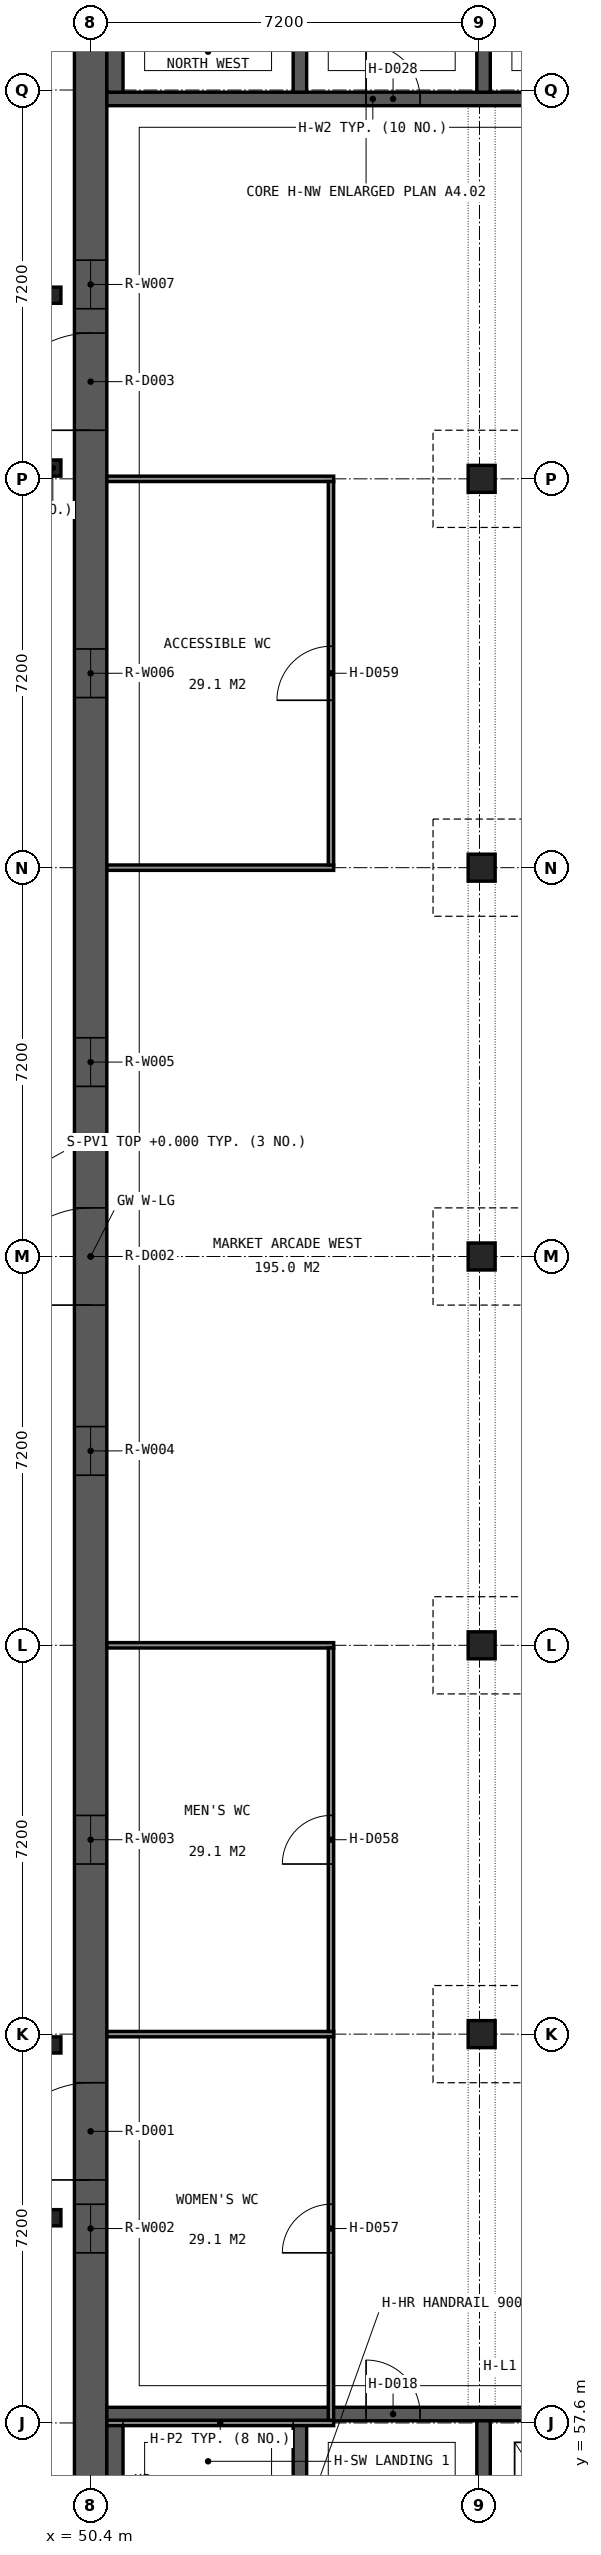
"""IFC4 building model, lengths in metres.
Left out: names, types, materials, properties, quantities, classifications, styles, units other than length and angle.
Written with IfcOpenShell. Run it as: python <this file> out.ifc"""

import sys

from ifc_helpers import new_model, si_unit, direction, frame, frame_2d, origin, origin_2d, place, context, subcontext, project, spatial, rectangle, extrude, element, fill, save


model = new_model("IFC4")
c1 = context("Model", 3, precision=1e-05, world=origin(), true_north=direction((0.0, 1.0)))
c2 = subcontext(c1, "Body", "Model", "MODEL_VIEW")
j1 = project(units=[si_unit("LENGTHUNIT", "METRE"), si_unit("PLANEANGLEUNIT", "RADIAN")], contexts=[c1])
p1 = place(None, origin())
s1 = spatial("IfcSite", under=j1, at=p1, CompositionType="ELEMENT")
p2 = place(p1, origin())
s2 = spatial("IfcBuilding", under=s1, at=p2, CompositionType="ELEMENT")
p3 = place(p2, origin())
s3 = spatial("IfcBuildingStorey", under=s2, at=p3, CompositionType="ELEMENT", Elevation=0.0)
p4 = place(p3, frame((50.4, 52.2, 0.0), z_axis=(0.0, 0.0, 1.0), x_axis=(0.0, 1.0, 0.0)))
e1 = element("IfcWall", 1, at=p4, inside=s3, PredefinedType="SOLIDWALL", context=c2, shape_type="SweptSolid", body=[
    extrude(rectangle(XDim=54.0, YDim=0.6, at=frame_2d((27.0, 0.0))), origin(), (0.0, 0.0, 1.0), 4.8),
])
p5 = place(p4, frame((1.35, 0.0, 0.9)))
e2 = element("IfcOpeningElement", 2, at=p5, cuts=e1, PredefinedType="OPENING", context=c2, shape_type="SweptSolid", body=[
    extrude(rectangle(XDim=0.9, YDim=3.3, at=frame_2d((0.45, 1.65))), frame((0.0, 0.31, 0.0), z_axis=(0.0, -1.0, 0.0), x_axis=(1.0, 0.0, 0.0)), (0.0, 0.0, 1.0), 0.62),
])
p6 = place(p4, frame((8.55, 0.0, 0.9)))
e3 = element("IfcOpeningElement", 3, at=p6, cuts=e1, PredefinedType="OPENING", context=c2, shape_type="SweptSolid", body=[
    extrude(rectangle(XDim=0.9, YDim=3.3, at=frame_2d((0.45, 1.65))), frame((0.0, 0.31, 0.0), z_axis=(0.0, -1.0, 0.0), x_axis=(1.0, 0.0, 0.0)), (0.0, 0.0, 1.0), 0.62),
])
p7 = place(p4, frame((15.75, 0.0, 0.9)))
e4 = element("IfcOpeningElement", 4, at=p7, cuts=e1, PredefinedType="OPENING", context=c2, shape_type="SweptSolid", body=[
    extrude(rectangle(XDim=0.9, YDim=3.3, at=frame_2d((0.45, 1.65))), frame((0.0, 0.31, 0.0), z_axis=(0.0, -1.0, 0.0), x_axis=(1.0, 0.0, 0.0)), (0.0, 0.0, 1.0), 0.62),
])
p8 = place(p4, frame((22.95, 0.0, 0.9)))
e5 = element("IfcOpeningElement", 5, at=p8, cuts=e1, PredefinedType="OPENING", context=c2, shape_type="SweptSolid", body=[
    extrude(rectangle(XDim=0.9, YDim=3.3, at=frame_2d((0.45, 1.65))), frame((0.0, 0.31, 0.0), z_axis=(0.0, -1.0, 0.0), x_axis=(1.0, 0.0, 0.0)), (0.0, 0.0, 1.0), 0.62),
])
p9 = place(p4, frame((30.15, 0.0, 0.9)))
e6 = element("IfcOpeningElement", 6, at=p9, cuts=e1, PredefinedType="OPENING", context=c2, shape_type="SweptSolid", body=[
    extrude(rectangle(XDim=0.9, YDim=3.3, at=frame_2d((0.45, 1.65))), frame((0.0, 0.31, 0.0), z_axis=(0.0, -1.0, 0.0), x_axis=(1.0, 0.0, 0.0)), (0.0, 0.0, 1.0), 0.62),
])
p10 = place(p4, frame((37.35, 0.0, 0.9)))
e7 = element("IfcOpeningElement", 7, at=p10, cuts=e1, PredefinedType="OPENING", context=c2, shape_type="SweptSolid", body=[
    extrude(rectangle(XDim=0.9, YDim=3.3, at=frame_2d((0.45, 1.65))), frame((0.0, 0.31, 0.0), z_axis=(0.0, -1.0, 0.0), x_axis=(1.0, 0.0, 0.0)), (0.0, 0.0, 1.0), 0.62),
])
p11 = place(p4, frame((44.55, 0.0, 0.9)))
e8 = element("IfcOpeningElement", 8, at=p11, cuts=e1, PredefinedType="OPENING", context=c2, shape_type="SweptSolid", body=[
    extrude(rectangle(XDim=0.9, YDim=3.3, at=frame_2d((0.45, 1.65))), frame((0.0, 0.31, 0.0), z_axis=(0.0, -1.0, 0.0), x_axis=(1.0, 0.0, 0.0)), (0.0, 0.0, 1.0), 0.62),
])
p12 = place(p4, frame((51.75, 0.0, 0.9)))
e9 = element("IfcOpeningElement", 9, at=p12, cuts=e1, PredefinedType="OPENING", context=c2, shape_type="SweptSolid", body=[
    extrude(rectangle(XDim=0.9, YDim=3.3, at=frame_2d((0.45, 1.65))), frame((0.0, 0.31, 0.0), z_axis=(0.0, -1.0, 0.0), x_axis=(1.0, 0.0, 0.0)), (0.0, 0.0, 1.0), 0.62),
])
p13 = place(p4, frame((9.9, 0.0, 0.0)))
e10 = element("IfcOpeningElement", 10, at=p13, cuts=e1, PredefinedType="OPENING", context=c2, shape_type="SweptSolid", body=[
    extrude(rectangle(XDim=1.8, YDim=2.4, at=frame_2d((0.9, 1.2))), frame((0.0, 0.31, 0.0), z_axis=(0.0, -1.0, 0.0), x_axis=(1.0, 0.0, 0.0)), (0.0, 0.0, 1.0), 0.62),
])
p14 = place(p4, frame((26.1, 0.0, 0.0)))
e11 = element("IfcOpeningElement", 11, at=p14, cuts=e1, PredefinedType="OPENING", context=c2, shape_type="SweptSolid", body=[
    extrude(rectangle(XDim=1.8, YDim=2.4, at=frame_2d((0.9, 1.2))), frame((0.0, 0.31, 0.0), z_axis=(0.0, -1.0, 0.0), x_axis=(1.0, 0.0, 0.0)), (0.0, 0.0, 1.0), 0.62),
])
p15 = place(p4, frame((42.3, 0.0, 0.0)))
e12 = element("IfcOpeningElement", 12, at=p15, cuts=e1, PredefinedType="OPENING", context=c2, shape_type="SweptSolid", body=[
    extrude(rectangle(XDim=1.8, YDim=2.4, at=frame_2d((0.9, 1.2))), frame((0.0, 0.31, 0.0), z_axis=(0.0, -1.0, 0.0), x_axis=(1.0, 0.0, 0.0)), (0.0, 0.0, 1.0), 0.62),
])
for number, where, z_axis, x_axis in (
    (13, (49.7, 93.8, 0.0), (0.0, 0.0, 1.0), (1.0, 0.0, 0.0)),
    (14, (49.7, 97.0, 0.0), (0.0, 0.0, 1.0), (1.0, 0.0, 0.0)),
    (15, (49.7, 61.4, 0.0), (0.0, 0.0, 1.0), (1.0, 0.0, 0.0)),
    (16, (49.7, 64.6, 0.0), (0.0, 0.0, 1.0), (1.0, 0.0, 0.0)),
):
    element("IfcColumn", number, at=place(p3, frame(where, z_axis=z_axis, x_axis=x_axis)), inside=s3, PredefinedType="COLUMN", context=c2, shape_type="SweptSolid", body=[
        extrude(rectangle(XDim=0.3, YDim=0.3, at=origin_2d()), origin(), (0.0, 0.0, 1.0), 4.6),
    ])
for number, where, z_axis, x_axis in (
    (17, (57.64, 64.8, 0.0), (0.0, 0.0, 1.0), (1.0, 0.0, 0.0)),
    (18, (57.64, 72.0, 0.0), (0.0, 0.0, 1.0), (1.0, 0.0, 0.0)),
    (19, (57.64, 79.2, 0.0), (0.0, 0.0, 1.0), (1.0, 0.0, 0.0)),
    (20, (57.64, 86.4, 0.0), (0.0, 0.0, 1.0), (1.0, 0.0, 0.0)),
    (21, (57.64, 93.6, 0.0), (0.0, 0.0, 1.0), (1.0, 0.0, 0.0)),
):
    element("IfcColumn", number, at=place(p3, frame(where, z_axis=z_axis, x_axis=x_axis)), inside=s3, PredefinedType="COLUMN", context=c2, shape_type="SweptSolid", body=[
        extrude(rectangle(XDim=0.5, YDim=0.5, at=origin_2d()), origin(), (0.0, 0.0, 1.0), 4.8),
    ])
p16 = place(p3, frame((50.7, 57.765, 0.0), z_axis=(0.0, 0.0, 1.0), x_axis=(1.0, 0.0, 0.0)))
e22 = element("IfcWall", 22, at=p16, inside=s3, PredefinedType="SOLIDWALL", context=c2, shape_type="SweptSolid", body=[
    extrude(rectangle(XDim=9.85, YDim=0.25, at=frame_2d((4.925, 0.0))), origin(), (0.0, 0.0, 1.0), 4.8),
])
p17 = place(p16, frame((4.8, 0.0, 0.0)))
e23 = element("IfcOpeningElement", 23, at=p17, cuts=e22, PredefinedType="OPENING", context=c2, shape_type="SweptSolid", body=[
    extrude(rectangle(XDim=1.0, YDim=2.1, at=frame_2d((0.5, 1.05))), frame((0.0, 0.135, 0.0), z_axis=(0.0, -1.0, 0.0), x_axis=(1.0, 0.0, 0.0)), (0.0, 0.0, 1.0), 0.27),
])
p18 = place(p3, frame((54.275, 51.0, 0.0), z_axis=(0.0, 0.0, 1.0), x_axis=(0.0, 1.0, 0.0)))
e24 = element("IfcWall", 24, at=p18, inside=s3, PredefinedType="SOLIDWALL", context=c2, shape_type="SweptSolid", body=[
    extrude(rectangle(XDim=6.64, YDim=0.25, at=frame_2d((3.32, 0.0))), origin(), (0.0, 0.0, 1.0), 4.8),
])
p19 = place(p18, frame((0.35, 0.0, 0.0)))
e25 = element("IfcOpeningElement", 25, at=p19, cuts=e24, PredefinedType="OPENING", context=c2, shape_type="SweptSolid", body=[
    extrude(rectangle(XDim=1.0, YDim=2.1, at=frame_2d((0.5, 1.05))), frame((0.0, 0.135, 0.0), z_axis=(0.0, -1.0, 0.0), x_axis=(1.0, 0.0, 0.0)), (0.0, 0.0, 1.0), 0.27),
])
p20 = place(p3, frame((57.675, 54.39, 0.0), z_axis=(0.0, 0.0, 1.0), x_axis=(0.0, 1.0, 0.0)))
e26 = element("IfcWall", 26, at=p20, inside=s3, PredefinedType="SOLIDWALL", context=c2, shape_type="SweptSolid", body=[
    extrude(rectangle(XDim=3.25, YDim=0.25, at=frame_2d((1.625, 0.0))), origin(), (0.0, 0.0, 1.0), 4.8),
])
p21 = place(p3, frame((50.85, 52.2, 0.0), z_axis=(0.0, 0.0, 1.0), x_axis=(0.0, 1.0, 0.0)))
e27 = element("IfcWall", 27, at=p21, inside=s3, PredefinedType="SOLIDWALL", context=c2, shape_type="SweptSolid", body=[
    extrude(rectangle(XDim=5.44, YDim=0.3, at=frame_2d((2.72, 0.0))), origin(), (0.0, 0.0, 1.0), 4.8),
])
p22 = place(p3, frame((50.7, 100.635, 0.0), z_axis=(0.0, 0.0, 1.0), x_axis=(1.0, 0.0, 0.0)))
e28 = element("IfcWall", 28, at=p22, inside=s3, PredefinedType="SOLIDWALL", context=c2, shape_type="SweptSolid", body=[
    extrude(rectangle(XDim=9.85, YDim=0.25, at=frame_2d((4.925, 0.0))), origin(), (0.0, 0.0, 1.0), 4.8),
])
p23 = place(p22, frame((4.8, 0.0, 0.0)))
e29 = element("IfcOpeningElement", 29, at=p23, cuts=e28, PredefinedType="OPENING", context=c2, shape_type="SweptSolid", body=[
    extrude(rectangle(XDim=1.0, YDim=2.1, at=frame_2d((0.5, 1.05))), frame((0.0, 0.135, 0.0), z_axis=(0.0, -1.0, 0.0), x_axis=(1.0, 0.0, 0.0)), (0.0, 0.0, 1.0), 0.27),
])
p24 = place(p3, frame((54.275, 100.76, 0.0), z_axis=(0.0, 0.0, 1.0), x_axis=(0.0, 1.0, 0.0)))
e30 = element("IfcWall", 30, at=p24, inside=s3, PredefinedType="SOLIDWALL", context=c2, shape_type="SweptSolid", body=[
    extrude(rectangle(XDim=6.64, YDim=0.25, at=frame_2d((3.32, 0.0))), origin(), (0.0, 0.0, 1.0), 4.8),
])
p25 = place(p24, frame((5.29, 0.0, 0.0)))
e31 = element("IfcOpeningElement", 31, at=p25, cuts=e30, PredefinedType="OPENING", context=c2, shape_type="SweptSolid", body=[
    extrude(rectangle(XDim=1.0, YDim=2.1, at=frame_2d((0.5, 1.05))), frame((0.0, 0.135, 0.0), z_axis=(0.0, -1.0, 0.0), x_axis=(1.0, 0.0, 0.0)), (0.0, 0.0, 1.0), 0.27),
])
p26 = place(p3, frame((57.675, 100.76, 0.0), z_axis=(0.0, 0.0, 1.0), x_axis=(0.0, 1.0, 0.0)))
e32 = element("IfcWall", 32, at=p26, inside=s3, PredefinedType="SOLIDWALL", context=c2, shape_type="SweptSolid", body=[
    extrude(rectangle(XDim=3.25, YDim=0.25, at=frame_2d((1.625, 0.0))), origin(), (0.0, 0.0, 1.0), 4.8),
])
p27 = place(p3, frame((50.85, 100.76, 0.0), z_axis=(0.0, 0.0, 1.0), x_axis=(0.0, 1.0, 0.0)))
e33 = element("IfcWall", 33, at=p27, inside=s3, PredefinedType="SOLIDWALL", context=c2, shape_type="SweptSolid", body=[
    extrude(rectangle(XDim=5.44, YDim=0.3, at=frame_2d((2.72, 0.0))), origin(), (0.0, 0.0, 1.0), 4.8),
])
for number, where, z_axis, x_axis in (
    (34, (50.7, 57.6, 0.0), (0.0, 0.0, 1.0), (1.0, 0.0, 0.0)),
    (35, (50.7, 64.8, 0.0), (0.0, 0.0, 1.0), (1.0, 0.0, 0.0)),
    (36, (50.7, 72.0, 0.0), (0.0, 0.0, 1.0), (1.0, 0.0, 0.0)),
    (37, (50.7, 86.4, 0.0), (0.0, 0.0, 1.0), (1.0, 0.0, 0.0)),
    (38, (50.7, 93.6, 0.0), (0.0, 0.0, 1.0), (1.0, 0.0, 0.0)),
):
    element("IfcWall", number, at=place(p3, frame(where, z_axis=z_axis, x_axis=x_axis)), inside=s3, PredefinedType="PARTITIONING", context=c2, shape_type="SweptSolid", body=[
        extrude(rectangle(XDim=4.2, YDim=0.1, at=frame_2d((2.1, 0.0))), origin(), (0.0, 0.0, 1.0), 3.95),
    ])
p28 = place(p3, frame((54.85, 57.65, 0.0), z_axis=(0.0, 0.0, 1.0), x_axis=(0.0, 1.0, 0.0)))
e39 = element("IfcWall", 39, at=p28, inside=s3, PredefinedType="PARTITIONING", context=c2, shape_type="SweptSolid", body=[
    extrude(rectangle(XDim=7.1, YDim=0.1, at=frame_2d((3.55, 0.0))), origin(), (0.0, 0.0, 1.0), 3.95),
])
p29 = place(p28, frame((3.1, 0.0, 0.0)))
e40 = element("IfcOpeningElement", 40, at=p29, cuts=e39, PredefinedType="OPENING", context=c2, shape_type="SweptSolid", body=[
    extrude(rectangle(XDim=0.9, YDim=2.1, at=frame_2d((0.45, 1.05))), frame((0.0, 0.06, 0.0), z_axis=(0.0, -1.0, 0.0), x_axis=(1.0, 0.0, 0.0)), (0.0, 0.0, 1.0), 0.12),
])
p30 = place(p3, frame((54.85, 64.85, 0.0), z_axis=(0.0, 0.0, 1.0), x_axis=(0.0, 1.0, 0.0)))
e41 = element("IfcWall", 41, at=p30, inside=s3, PredefinedType="PARTITIONING", context=c2, shape_type="SweptSolid", body=[
    extrude(rectangle(XDim=7.1, YDim=0.1, at=frame_2d((3.55, 0.0))), origin(), (0.0, 0.0, 1.0), 3.95),
])
p31 = place(p30, frame((3.1, 0.0, 0.0)))
e42 = element("IfcOpeningElement", 42, at=p31, cuts=e41, PredefinedType="OPENING", context=c2, shape_type="SweptSolid", body=[
    extrude(rectangle(XDim=0.9, YDim=2.1, at=frame_2d((0.45, 1.05))), frame((0.0, 0.06, 0.0), z_axis=(0.0, -1.0, 0.0), x_axis=(1.0, 0.0, 0.0)), (0.0, 0.0, 1.0), 0.12),
])
p32 = place(p3, frame((54.85, 86.45, 0.0), z_axis=(0.0, 0.0, 1.0), x_axis=(0.0, 1.0, 0.0)))
e43 = element("IfcWall", 43, at=p32, inside=s3, PredefinedType="PARTITIONING", context=c2, shape_type="SweptSolid", body=[
    extrude(rectangle(XDim=7.1, YDim=0.1, at=frame_2d((3.55, 0.0))), origin(), (0.0, 0.0, 1.0), 3.95),
])
p33 = place(p32, frame((3.05, 0.0, 0.0)))
e44 = element("IfcOpeningElement", 44, at=p33, cuts=e43, PredefinedType="OPENING", context=c2, shape_type="SweptSolid", body=[
    extrude(rectangle(XDim=1.0, YDim=2.1, at=frame_2d((0.5, 1.05))), frame((0.0, 0.06, 0.0), z_axis=(0.0, -1.0, 0.0), x_axis=(1.0, 0.0, 0.0)), (0.0, 0.0, 1.0), 0.12),
])
p34 = place(p6, origin())
e45 = element("IfcWindow", 45, at=p34, inside=s3, PartitioningType="SINGLE_PANEL", PredefinedType="WINDOW", context=c2, shape_type="SweptSolid", body=[
    extrude(rectangle(XDim=0.9, YDim=3.3, at=frame_2d((0.45, 1.65))), frame((0.0, 0.03, 0.0), z_axis=(0.0, -1.0, 0.0), x_axis=(1.0, 0.0, 0.0)), (0.0, 0.0, 1.0), 0.06),
])
fill(e3, e45)
p35 = place(p7, origin())
e46 = element("IfcWindow", 46, at=p35, inside=s3, PartitioningType="SINGLE_PANEL", PredefinedType="WINDOW", context=c2, shape_type="SweptSolid", body=[
    extrude(rectangle(XDim=0.9, YDim=3.3, at=frame_2d((0.45, 1.65))), frame((0.0, 0.03, 0.0), z_axis=(0.0, -1.0, 0.0), x_axis=(1.0, 0.0, 0.0)), (0.0, 0.0, 1.0), 0.06),
])
fill(e4, e46)
p36 = place(p8, origin())
e47 = element("IfcWindow", 47, at=p36, inside=s3, PartitioningType="SINGLE_PANEL", PredefinedType="WINDOW", context=c2, shape_type="SweptSolid", body=[
    extrude(rectangle(XDim=0.9, YDim=3.3, at=frame_2d((0.45, 1.65))), frame((0.0, 0.03, 0.0), z_axis=(0.0, -1.0, 0.0), x_axis=(1.0, 0.0, 0.0)), (0.0, 0.0, 1.0), 0.06),
])
fill(e5, e47)
p37 = place(p9, origin())
e48 = element("IfcWindow", 48, at=p37, inside=s3, PartitioningType="SINGLE_PANEL", PredefinedType="WINDOW", context=c2, shape_type="SweptSolid", body=[
    extrude(rectangle(XDim=0.9, YDim=3.3, at=frame_2d((0.45, 1.65))), frame((0.0, 0.03, 0.0), z_axis=(0.0, -1.0, 0.0), x_axis=(1.0, 0.0, 0.0)), (0.0, 0.0, 1.0), 0.06),
])
fill(e6, e48)
p38 = place(p10, origin())
e49 = element("IfcWindow", 49, at=p38, inside=s3, PartitioningType="SINGLE_PANEL", PredefinedType="WINDOW", context=c2, shape_type="SweptSolid", body=[
    extrude(rectangle(XDim=0.9, YDim=3.3, at=frame_2d((0.45, 1.65))), frame((0.0, 0.03, 0.0), z_axis=(0.0, -1.0, 0.0), x_axis=(1.0, 0.0, 0.0)), (0.0, 0.0, 1.0), 0.06),
])
fill(e7, e49)
p39 = place(p11, origin())
e50 = element("IfcWindow", 50, at=p39, inside=s3, PartitioningType="SINGLE_PANEL", PredefinedType="WINDOW", context=c2, shape_type="SweptSolid", body=[
    extrude(rectangle(XDim=0.9, YDim=3.3, at=frame_2d((0.45, 1.65))), frame((0.0, 0.03, 0.0), z_axis=(0.0, -1.0, 0.0), x_axis=(1.0, 0.0, 0.0)), (0.0, 0.0, 1.0), 0.06),
])
fill(e8, e50)
p40 = place(p13, origin())
e51 = element("IfcDoor", 51, at=p40, inside=s3, OperationType="DOUBLE_DOOR_SINGLE_SWING", PredefinedType="DOOR", context=c2, shape_type="SweptSolid", body=[
    extrude(rectangle(XDim=1.8, YDim=2.4, at=frame_2d((0.9, 1.2))), frame((0.0, 0.025, 0.0), z_axis=(0.0, -1.0, 0.0), x_axis=(1.0, 0.0, 0.0)), (0.0, 0.0, 1.0), 0.05),
])
fill(e10, e51)
p41 = place(p14, origin())
e52 = element("IfcDoor", 52, at=p41, inside=s3, OperationType="DOUBLE_DOOR_SINGLE_SWING", PredefinedType="DOOR", context=c2, shape_type="SweptSolid", body=[
    extrude(rectangle(XDim=1.8, YDim=2.4, at=frame_2d((0.9, 1.2))), frame((0.0, 0.025, 0.0), z_axis=(0.0, -1.0, 0.0), x_axis=(1.0, 0.0, 0.0)), (0.0, 0.0, 1.0), 0.05),
])
fill(e11, e52)
p42 = place(p15, origin())
e53 = element("IfcDoor", 53, at=p42, inside=s3, OperationType="DOUBLE_DOOR_SINGLE_SWING", PredefinedType="DOOR", context=c2, shape_type="SweptSolid", body=[
    extrude(rectangle(XDim=1.8, YDim=2.4, at=frame_2d((0.9, 1.2))), frame((0.0, 0.025, 0.0), z_axis=(0.0, -1.0, 0.0), x_axis=(1.0, 0.0, 0.0)), (0.0, 0.0, 1.0), 0.05),
])
fill(e12, e53)
p43 = place(p17, origin())
e54 = element("IfcDoor", 54, at=p43, inside=s3, OperationType="SINGLE_SWING_LEFT", PredefinedType="DOOR", context=c2, shape_type="SweptSolid", body=[
    extrude(rectangle(XDim=1.0, YDim=2.1, at=frame_2d((0.5, 1.05))), frame((0.0, 0.025, 0.0), z_axis=(0.0, -1.0, 0.0), x_axis=(1.0, 0.0, 0.0)), (0.0, 0.0, 1.0), 0.05),
])
fill(e23, e54)
p44 = place(p23, origin())
e55 = element("IfcDoor", 55, at=p44, inside=s3, OperationType="SINGLE_SWING_LEFT", PredefinedType="DOOR", context=c2, shape_type="SweptSolid", body=[
    extrude(rectangle(XDim=1.0, YDim=2.1, at=frame_2d((0.5, 1.05))), frame((0.0, 0.025, 0.0), z_axis=(0.0, -1.0, 0.0), x_axis=(1.0, 0.0, 0.0)), (0.0, 0.0, 1.0), 0.05),
])
fill(e29, e55)
p45 = place(p29, origin())
e56 = element("IfcDoor", 56, at=p45, inside=s3, OperationType="SINGLE_SWING_LEFT", PredefinedType="DOOR", context=c2, shape_type="SweptSolid", body=[
    extrude(rectangle(XDim=0.9, YDim=2.1, at=frame_2d((0.45, 1.05))), frame((0.0, 0.025, 0.0), z_axis=(0.0, -1.0, 0.0), x_axis=(1.0, 0.0, 0.0)), (0.0, 0.0, 1.0), 0.05),
])
fill(e40, e56)
p46 = place(p31, origin())
e57 = element("IfcDoor", 57, at=p46, inside=s3, OperationType="SINGLE_SWING_LEFT", PredefinedType="DOOR", context=c2, shape_type="SweptSolid", body=[
    extrude(rectangle(XDim=0.9, YDim=2.1, at=frame_2d((0.45, 1.05))), frame((0.0, 0.025, 0.0), z_axis=(0.0, -1.0, 0.0), x_axis=(1.0, 0.0, 0.0)), (0.0, 0.0, 1.0), 0.05),
])
fill(e42, e57)
p47 = place(p33, origin())
e58 = element("IfcDoor", 58, at=p47, inside=s3, OperationType="SINGLE_SWING_LEFT", PredefinedType="DOOR", context=c2, shape_type="SweptSolid", body=[
    extrude(rectangle(XDim=1.0, YDim=2.1, at=frame_2d((0.5, 1.05))), frame((0.0, 0.025, 0.0), z_axis=(0.0, -1.0, 0.0), x_axis=(1.0, 0.0, 0.0)), (0.0, 0.0, 1.0), 0.05),
])
fill(e44, e58)
save(model, sys.argv[1])
